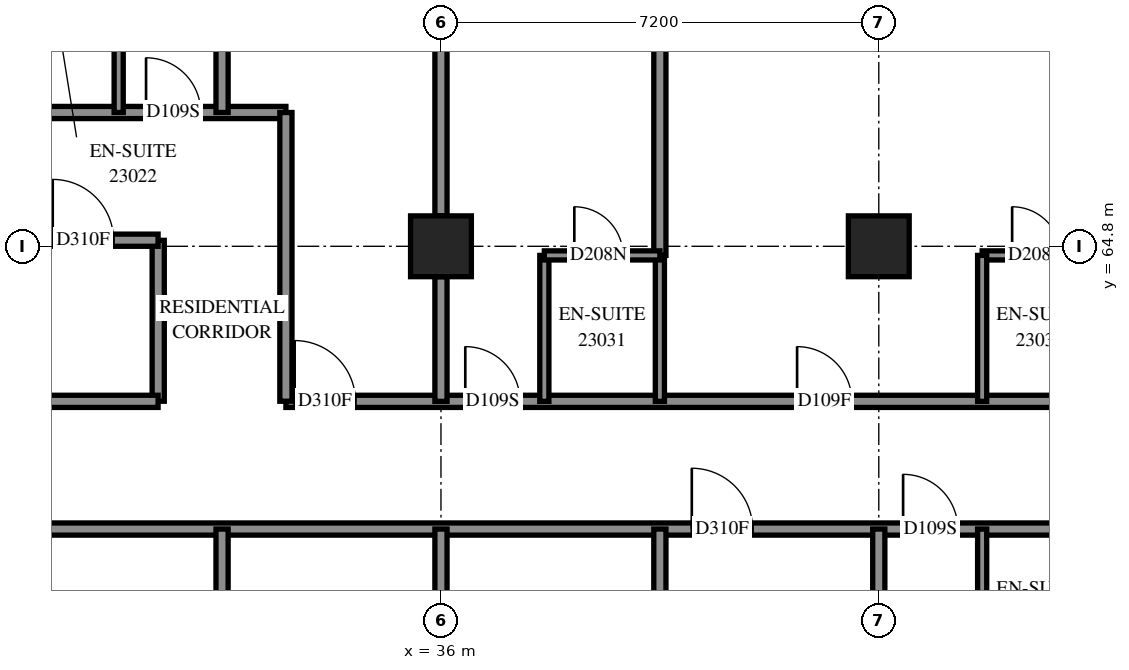
"""IFC4 building model, lengths in metres.
Left out: names, types, materials, properties, quantities, classifications, styles, units other than length and angle.
Written with IfcOpenShell. Run it as: python <this file> out.ifc"""

import sys

from ifc_helpers import new_model, si_unit, direction, frame, frame_2d, origin, origin_2d, place, context, subcontext, project, spatial, rectangle, extrude, element, fill, save


model = new_model("IFC4")
c1 = context("Model", 3, precision=1e-05, world=origin(), true_north=direction((0.0, 1.0)))
c2 = subcontext(c1, "Body", "Model", "MODEL_VIEW")
j1 = project(units=[si_unit("LENGTHUNIT", "METRE"), si_unit("PLANEANGLEUNIT", "RADIAN")], contexts=[c1])
p1 = place(None, origin())
s1 = spatial("IfcSite", under=j1, at=p1, CompositionType="ELEMENT")
p2 = place(p1, origin())
s2 = spatial("IfcBuilding", under=s1, at=p2, CompositionType="ELEMENT")
p3 = place(p2, frame((0.0, 0.0, 88.0)))
s3 = spatial("IfcBuildingStorey", under=s2, at=p3, CompositionType="ELEMENT", Elevation=88.0)
for number, where, z_axis, x_axis in (
    (1, (36.0, 64.8, 0.0), (0.0, 0.0, 1.0), (1.0, 0.0, 0.0)),
    (2, (43.2, 64.8, 0.0), (0.0, 0.0, 1.0), (1.0, 0.0, 0.0)),
):
    element("IfcColumn", number, at=place(p3, frame(where, z_axis=z_axis, x_axis=x_axis)), inside=s3, PredefinedType="COLUMN", context=c2, shape_type="SweptSolid", body=[
        extrude(rectangle(XDim=1.0, YDim=1.0, at=origin_2d()), origin(), (0.0, 0.0, 1.0), 3.1),
    ])
p4 = place(p3, frame((28.8, 60.15, 0.0), z_axis=(0.0, 0.0, 1.0), x_axis=(1.0, 0.0, 0.0)))
e3 = element("IfcWall", 3, at=p4, inside=s3, PredefinedType="PARTITIONING", context=c2, shape_type="SweptSolid", body=[
    extrude(rectangle(XDim=24.15, YDim=0.2, at=frame_2d((12.075, 0.0))), origin(), (0.0, 0.0, 1.0), 3.1),
])
p5 = place(p4, frame((11.325, 0.0, 0.0)))
e4 = element("IfcOpeningElement", 4, at=p5, cuts=e3, PredefinedType="OPENING", context=c2, shape_type="SweptSolid", body=[
    extrude(rectangle(XDim=1.0, YDim=2.1, at=frame_2d((0.5, 1.05))), frame((0.0, 0.11, 0.0), z_axis=(0.0, -1.0, 0.0), x_axis=(1.0, 0.0, 0.0)), (0.0, 0.0, 1.0), 0.22),
])
p6 = place(p4, frame((14.8, 0.0, 0.0)))
e5 = element("IfcOpeningElement", 5, at=p6, cuts=e3, PredefinedType="OPENING", context=c2, shape_type="SweptSolid", body=[
    extrude(rectangle(XDim=0.9, YDim=2.1, at=frame_2d((0.45, 1.05))), frame((0.0, 0.11, 0.0), z_axis=(0.0, -1.0, 0.0), x_axis=(1.0, 0.0, 0.0)), (0.0, 0.0, 1.0), 0.22),
])
p7 = place(p4, frame((18.508, 0.0, 0.0)))
e6 = element("IfcOpeningElement", 6, at=p7, cuts=e3, PredefinedType="OPENING", context=c2, shape_type="SweptSolid", body=[
    extrude(rectangle(XDim=1.0, YDim=2.1, at=frame_2d((0.5, 1.05))), frame((0.0, 0.11, 0.0), z_axis=(0.0, -1.0, 0.0), x_axis=(1.0, 0.0, 0.0)), (0.0, 0.0, 1.0), 0.22),
])
p8 = place(p4, frame((22.882, 0.0, 0.0)))
e7 = element("IfcOpeningElement", 7, at=p8, cuts=e3, PredefinedType="OPENING", context=c2, shape_type="SweptSolid", body=[
    extrude(rectangle(XDim=1.0, YDim=2.1, at=frame_2d((0.5, 1.05))), frame((0.0, 0.11, 0.0), z_axis=(0.0, -1.0, 0.0), x_axis=(1.0, 0.0, 0.0)), (0.0, 0.0, 1.0), 0.22),
])
p9 = place(p3, frame((33.45, 62.25, 0.0), z_axis=(0.0, 0.0, 1.0), x_axis=(1.0, 0.0, 0.0)))
e8 = element("IfcWall", 8, at=p9, inside=s3, PredefinedType="PARTITIONING", context=c2, shape_type="SweptSolid", body=[
    extrude(rectangle(XDim=21.85, YDim=0.2, at=frame_2d((10.925, 0.0))), origin(), (0.0, 0.0, 1.0), 3.1),
])
p10 = place(p9, frame((0.144, 0.0, 0.0)))
e9 = element("IfcOpeningElement", 9, at=p10, cuts=e8, PredefinedType="OPENING", context=c2, shape_type="SweptSolid", body=[
    extrude(rectangle(XDim=1.0, YDim=2.1, at=frame_2d((0.5, 1.05))), frame((0.0, 0.11, 0.0), z_axis=(0.0, -1.0, 0.0), x_axis=(1.0, 0.0, 0.0)), (0.0, 0.0, 1.0), 0.22),
])
p11 = place(p9, frame((2.95, 0.0, 0.0)))
e10 = element("IfcOpeningElement", 10, at=p11, cuts=e8, PredefinedType="OPENING", context=c2, shape_type="SweptSolid", body=[
    extrude(rectangle(XDim=0.9, YDim=2.1, at=frame_2d((0.45, 1.05))), frame((0.0, 0.11, 0.0), z_axis=(0.0, -1.0, 0.0), x_axis=(1.0, 0.0, 0.0)), (0.0, 0.0, 1.0), 0.22),
])
p12 = place(p9, frame((8.407, 0.0, 0.0)))
e11 = element("IfcOpeningElement", 11, at=p12, cuts=e8, PredefinedType="OPENING", context=c2, shape_type="SweptSolid", body=[
    extrude(rectangle(XDim=0.9, YDim=2.1, at=frame_2d((0.45, 1.05))), frame((0.0, 0.11, 0.0), z_axis=(0.0, -1.0, 0.0), x_axis=(1.0, 0.0, 0.0)), (0.0, 0.0, 1.0), 0.22),
])
p13 = place(p9, frame((15.7, 0.0, 0.0)))
e12 = element("IfcOpeningElement", 12, at=p13, cuts=e8, PredefinedType="OPENING", context=c2, shape_type="SweptSolid", body=[
    extrude(rectangle(XDim=0.9, YDim=2.1, at=frame_2d((0.45, 1.05))), frame((0.0, 0.11, 0.0), z_axis=(0.0, -1.0, 0.0), x_axis=(1.0, 0.0, 0.0)), (0.0, 0.0, 1.0), 0.22),
])
p14 = place(p9, frame((17.35, 0.0, 0.0)))
e13 = element("IfcOpeningElement", 13, at=p14, cuts=e8, PredefinedType="OPENING", context=c2, shape_type="SweptSolid", body=[
    extrude(rectangle(XDim=0.9, YDim=2.1, at=frame_2d((0.45, 1.05))), frame((0.0, 0.11, 0.0), z_axis=(0.0, -1.0, 0.0), x_axis=(1.0, 0.0, 0.0)), (0.0, 0.0, 1.0), 0.22),
])
p15 = place(p3, frame((21.602, 67.0, 0.0), z_axis=(0.0, 0.0, 1.0), x_axis=(1.0, 0.0, 0.0)))
e14 = element("IfcWall", 14, at=p15, inside=s3, PredefinedType="PARTITIONING", context=c2, shape_type="SweptSolid", body=[
    extrude(rectangle(XDim=11.848, YDim=0.2, at=frame_2d((5.924, 0.0))), origin(), (0.0, 0.0, 1.0), 3.1),
])
p16 = place(p15, frame((1.791, 0.0, 0.0)))
e15 = element("IfcOpeningElement", 15, at=p16, cuts=e14, PredefinedType="OPENING", context=c2, shape_type="SweptSolid", body=[
    extrude(rectangle(XDim=1.0, YDim=2.1, at=frame_2d((0.5, 1.05))), frame((0.0, 0.11, 0.0), z_axis=(0.0, -1.0, 0.0), x_axis=(1.0, 0.0, 0.0)), (0.0, 0.0, 1.0), 0.22),
])
p17 = place(p15, frame((3.998, 0.0, 0.0)))
e16 = element("IfcOpeningElement", 16, at=p17, cuts=e14, PredefinedType="OPENING", context=c2, shape_type="SweptSolid", body=[
    extrude(rectangle(XDim=0.9, YDim=2.1, at=frame_2d((0.45, 1.05))), frame((0.0, 0.11, 0.0), z_axis=(0.0, -1.0, 0.0), x_axis=(1.0, 0.0, 0.0)), (0.0, 0.0, 1.0), 0.22),
])
p18 = place(p15, frame((9.548, 0.0, 0.0)))
e17 = element("IfcOpeningElement", 17, at=p18, cuts=e14, PredefinedType="OPENING", context=c2, shape_type="SweptSolid", body=[
    extrude(rectangle(XDim=0.9, YDim=2.1, at=frame_2d((0.45, 1.05))), frame((0.0, 0.11, 0.0), z_axis=(0.0, -1.0, 0.0), x_axis=(1.0, 0.0, 0.0)), (0.0, 0.0, 1.0), 0.22),
])
p19 = place(p3, frame((39.6, 64.65, 0.0), z_axis=(0.0, 0.0, 1.0), x_axis=(0.0, 1.0, 0.0)))
e18 = element("IfcWall", 18, at=p19, inside=s3, PredefinedType="PARTITIONING", context=c2, shape_type="SweptSolid", body=[
    extrude(rectangle(XDim=8.112, YDim=0.2, at=frame_2d((4.056, 0.0))), origin(), (0.0, 0.0, 1.0), 3.1),
])
p20 = place(p3, frame((36.0, 65.3, 0.0), z_axis=(0.0, 0.0, 1.0), x_axis=(0.0, 1.0, 0.0)))
e19 = element("IfcWall", 19, at=p20, inside=s3, PredefinedType="PARTITIONING", context=c2, shape_type="SweptSolid", body=[
    extrude(rectangle(XDim=6.2, YDim=0.2, at=frame_2d((3.1, 0.0))), origin(), (0.0, 0.0, 1.0), 3.1),
])
p21 = place(p3, frame((32.4, 67.0, 0.0), z_axis=(0.0, 0.0, 1.0), x_axis=(0.0, 1.0, 0.0)))
e20 = element("IfcWall", 20, at=p21, inside=s3, PredefinedType="PARTITIONING", context=c2, shape_type="SweptSolid", body=[
    extrude(rectangle(XDim=5.799, YDim=0.2, at=frame_2d((2.899, 0.0))), origin(), (0.0, 0.0, 1.0), 3.1),
])
p22 = place(p3, frame((33.45, 62.252, 0.0), z_axis=(0.0, 0.0, 1.0), x_axis=(0.0, 1.0, 0.0)))
e21 = element("IfcWall", 21, at=p22, inside=s3, PredefinedType="PARTITIONING", context=c2, shape_type="SweptSolid", body=[
    extrude(rectangle(XDim=4.748, YDim=0.2, at=frame_2d((2.374, 0.0))), origin(), (0.0, 0.0, 1.0), 3.1),
])
for number, where, z_axis, x_axis in (
    (22, (32.4, 55.989, 0.0), (0.0, 0.0, 1.0), (0.0, 1.0, 0.0)),
    (23, (39.6, 55.989, 0.0), (0.0, 0.0, 1.0), (0.0, 1.0, 0.0)),
):
    element("IfcWall", number, at=place(p3, frame(where, z_axis=z_axis, x_axis=x_axis)), inside=s3, PredefinedType="PARTITIONING", context=c2, shape_type="SweptSolid", body=[
        extrude(rectangle(XDim=4.161, YDim=0.2, at=frame_2d((2.08, 0.0))), origin(), (0.0, 0.0, 1.0), 3.1),
    ])
p23 = place(p3, frame((44.9, 64.65, 0.0), z_axis=(0.0, 0.0, 1.0), x_axis=(1.0, 0.0, 0.0)))
e24 = element("IfcWall", 24, at=p23, inside=s3, PredefinedType="PARTITIONING", context=c2, shape_type="SweptSolid", body=[
    extrude(rectangle(XDim=3.8, YDim=0.15, at=frame_2d((1.9, 0.0))), origin(), (0.0, 0.0, 1.0), 3.1),
])
p24 = place(p23, frame((0.493, 0.0, 0.0)))
e25 = element("IfcOpeningElement", 25, at=p24, cuts=e24, PredefinedType="OPENING", context=c2, shape_type="SweptSolid", body=[
    extrude(rectangle(XDim=0.8, YDim=2.1, at=frame_2d((0.4, 1.05))), frame((0.0, 0.085, 0.0), z_axis=(0.0, -1.0, 0.0), x_axis=(1.0, 0.0, 0.0)), (0.0, 0.0, 1.0), 0.17),
])
p25 = place(p23, frame((2.507, 0.0, 0.0)))
e26 = element("IfcOpeningElement", 26, at=p25, cuts=e24, PredefinedType="OPENING", context=c2, shape_type="SweptSolid", body=[
    extrude(rectangle(XDim=0.8, YDim=2.1, at=frame_2d((0.4, 1.05))), frame((0.0, 0.085, 0.0), z_axis=(0.0, -1.0, 0.0), x_axis=(1.0, 0.0, 0.0)), (0.0, 0.0, 1.0), 0.17),
])
p26 = place(p3, frame((31.35, 62.252, 0.0), z_axis=(0.0, 0.0, 1.0), x_axis=(0.0, 1.0, 0.0)))
e27 = element("IfcWall", 27, at=p26, inside=s3, PredefinedType="PARTITIONING", context=c2, shape_type="SweptSolid", body=[
    extrude(rectangle(XDim=2.646, YDim=0.2, at=frame_2d((1.323, 0.0))), origin(), (0.0, 0.0, 1.0), 3.1),
])
p27 = place(p3, frame((28.802, 62.25, 0.0), z_axis=(0.0, 0.0, 1.0), x_axis=(1.0, 0.0, 0.0)))
e28 = element("IfcWall", 28, at=p27, inside=s3, PredefinedType="PARTITIONING", context=c2, shape_type="SweptSolid", body=[
    extrude(rectangle(XDim=2.546, YDim=0.2, at=frame_2d((1.273, 0.0))), origin(), (0.0, 0.0, 1.0), 3.1),
])
for number, where, z_axis, x_axis in (
    (29, (30.7, 67.0, 0.0), (0.0, 0.0, 1.0), (0.0, 1.0, 0.0)),
    (30, (37.7, 62.25, 0.0), (0.0, 0.0, 1.0), (0.0, 1.0, 0.0)),
    (31, (39.6, 62.25, 0.0), (0.0, 0.0, 1.0), (0.0, 1.0, 0.0)),
    (32, (44.9, 62.25, 0.0), (0.0, 0.0, 1.0), (0.0, 1.0, 0.0)),
    (33, (44.9, 57.75, 0.0), (0.0, 0.0, 1.0), (0.0, 1.0, 0.0)),
):
    element("IfcWall", number, at=place(p3, frame(where, z_axis=z_axis, x_axis=x_axis)), inside=s3, PredefinedType="PARTITIONING", context=c2, shape_type="SweptSolid", body=[
        extrude(rectangle(XDim=2.4, YDim=0.15, at=frame_2d((1.2, 0.0))), origin(), (0.0, 0.0, 1.0), 3.1),
    ])
for number, where, z_axis, x_axis in (
    (34, (36.0, 58.1, 0.0), (0.0, 0.0, 1.0), (0.0, 1.0, 0.0)),
    (35, (36.0, 62.25, 0.0), (0.0, 0.0, 1.0), (0.0, 1.0, 0.0)),
    (36, (43.2, 58.1, 0.0), (0.0, 0.0, 1.0), (0.0, 1.0, 0.0)),
):
    element("IfcWall", number, at=place(p3, frame(where, z_axis=z_axis, x_axis=x_axis)), inside=s3, PredefinedType="PARTITIONING", context=c2, shape_type="SweptSolid", body=[
        extrude(rectangle(XDim=2.05, YDim=0.2, at=frame_2d((1.025, 0.0))), origin(), (0.0, 0.0, 1.0), 3.1),
    ])
p28 = place(p3, frame((29.3, 64.9, 0.0), z_axis=(0.0, 0.0, 1.0), x_axis=(1.0, 0.0, 0.0)))
e37 = element("IfcWall", 37, at=p28, inside=s3, PredefinedType="PARTITIONING", context=c2, shape_type="SweptSolid", body=[
    extrude(rectangle(XDim=2.048, YDim=0.2, at=frame_2d((1.024, 0.0))), origin(), (0.0, 0.0, 1.0), 3.1),
])
p29 = place(p28, frame((0.316, 0.0, 0.0)))
e38 = element("IfcOpeningElement", 38, at=p29, cuts=e37, PredefinedType="OPENING", context=c2, shape_type="SweptSolid", body=[
    extrude(rectangle(XDim=1.0, YDim=2.1, at=frame_2d((0.5, 1.05))), frame((0.0, 0.11, 0.0), z_axis=(0.0, -1.0, 0.0), x_axis=(1.0, 0.0, 0.0)), (0.0, 0.0, 1.0), 0.22),
])
p30 = place(p3, frame((37.7, 64.65, 0.0), z_axis=(0.0, 0.0, 1.0), x_axis=(1.0, 0.0, 0.0)))
e39 = element("IfcWall", 39, at=p30, inside=s3, PredefinedType="PARTITIONING", context=c2, shape_type="SweptSolid", body=[
    extrude(rectangle(XDim=1.9, YDim=0.15, at=frame_2d((0.95, 0.0))), origin(), (0.0, 0.0, 1.0), 3.1),
])
p31 = place(p30, frame((0.493, 0.0, 0.0)))
e40 = element("IfcOpeningElement", 40, at=p31, cuts=e39, PredefinedType="OPENING", context=c2, shape_type="SweptSolid", body=[
    extrude(rectangle(XDim=0.8, YDim=2.1, at=frame_2d((0.4, 1.05))), frame((0.0, 0.085, 0.0), z_axis=(0.0, -1.0, 0.0), x_axis=(1.0, 0.0, 0.0)), (0.0, 0.0, 1.0), 0.17),
])
p32 = place(p29, origin())
e41 = element("IfcDoor", 41, at=p32, inside=s3, OperationType="SINGLE_SWING_RIGHT", PredefinedType="DOOR", context=c2, shape_type="SweptSolid", body=[
    extrude(rectangle(XDim=1.0, YDim=2.1, at=frame_2d((0.5, 1.05))), frame((0.0, 0.025, 0.0), z_axis=(0.0, -1.0, 0.0), x_axis=(1.0, 0.0, 0.0)), (0.0, 0.0, 1.0), 0.05),
])
fill(e38, e41)
p33 = place(p18, origin())
e42 = element("IfcDoor", 42, at=p33, inside=s3, OperationType="SINGLE_SWING_RIGHT", PredefinedType="DOOR", context=c2, shape_type="SweptSolid", body=[
    extrude(rectangle(XDim=0.9, YDim=2.1, at=frame_2d((0.45, 1.05))), frame((0.0, 0.025, 0.0), z_axis=(0.0, -1.0, 0.0), x_axis=(1.0, 0.0, 0.0)), (0.0, 0.0, 1.0), 0.05),
])
fill(e17, e42)
p34 = place(p10, origin())
e43 = element("IfcDoor", 43, at=p34, inside=s3, OperationType="SINGLE_SWING_LEFT", PredefinedType="DOOR", context=c2, shape_type="SweptSolid", body=[
    extrude(rectangle(XDim=1.0, YDim=2.1, at=frame_2d((0.5, 1.05))), frame((0.0, 0.025, 0.0), z_axis=(0.0, -1.0, 0.0), x_axis=(1.0, 0.0, 0.0)), (0.0, 0.0, 1.0), 0.05),
])
fill(e9, e43)
p35 = place(p11, origin())
e44 = element("IfcDoor", 44, at=p35, inside=s3, OperationType="SINGLE_SWING_RIGHT", PredefinedType="DOOR", context=c2, shape_type="SweptSolid", body=[
    extrude(rectangle(XDim=0.9, YDim=2.1, at=frame_2d((0.45, 1.05))), frame((0.0, 0.025, 0.0), z_axis=(0.0, -1.0, 0.0), x_axis=(1.0, 0.0, 0.0)), (0.0, 0.0, 1.0), 0.05),
])
fill(e10, e44)
p36 = place(p31, origin())
e45 = element("IfcDoor", 45, at=p36, inside=s3, OperationType="SINGLE_SWING_RIGHT", PredefinedType="DOOR", context=c2, shape_type="SweptSolid", body=[
    extrude(rectangle(XDim=0.8, YDim=2.1, at=frame_2d((0.4, 1.05))), frame((0.0, 0.025, 0.0), z_axis=(0.0, -1.0, 0.0), x_axis=(1.0, 0.0, 0.0)), (0.0, 0.0, 1.0), 0.05),
])
fill(e40, e45)
p37 = place(p12, origin())
e46 = element("IfcDoor", 46, at=p37, inside=s3, OperationType="SINGLE_SWING_LEFT", PredefinedType="DOOR", context=c2, shape_type="SweptSolid", body=[
    extrude(rectangle(XDim=0.9, YDim=2.1, at=frame_2d((0.45, 1.05))), frame((0.0, 0.025, 0.0), z_axis=(0.0, -1.0, 0.0), x_axis=(1.0, 0.0, 0.0)), (0.0, 0.0, 1.0), 0.05),
])
fill(e11, e46)
p38 = place(p24, origin())
e47 = element("IfcDoor", 47, at=p38, inside=s3, OperationType="SINGLE_SWING_RIGHT", PredefinedType="DOOR", context=c2, shape_type="SweptSolid", body=[
    extrude(rectangle(XDim=0.8, YDim=2.1, at=frame_2d((0.4, 1.05))), frame((0.0, 0.025, 0.0), z_axis=(0.0, -1.0, 0.0), x_axis=(1.0, 0.0, 0.0)), (0.0, 0.0, 1.0), 0.05),
])
fill(e25, e47)
p39 = place(p5, origin())
e48 = element("IfcDoor", 48, at=p39, inside=s3, OperationType="SINGLE_SWING_RIGHT", PredefinedType="DOOR", context=c2, shape_type="SweptSolid", body=[
    extrude(rectangle(XDim=1.0, YDim=2.1, at=frame_2d((0.5, 1.05))), frame((0.0, 0.025, 0.0), z_axis=(0.0, -1.0, 0.0), x_axis=(1.0, 0.0, 0.0)), (0.0, 0.0, 1.0), 0.05),
])
fill(e4, e48)
p40 = place(p6, origin())
e49 = element("IfcDoor", 49, at=p40, inside=s3, OperationType="SINGLE_SWING_LEFT", PredefinedType="DOOR", context=c2, shape_type="SweptSolid", body=[
    extrude(rectangle(XDim=0.9, YDim=2.1, at=frame_2d((0.45, 1.05))), frame((0.0, 0.025, 0.0), z_axis=(0.0, -1.0, 0.0), x_axis=(1.0, 0.0, 0.0)), (0.0, 0.0, 1.0), 0.05),
])
fill(e5, e49)
save(model, sys.argv[1])
